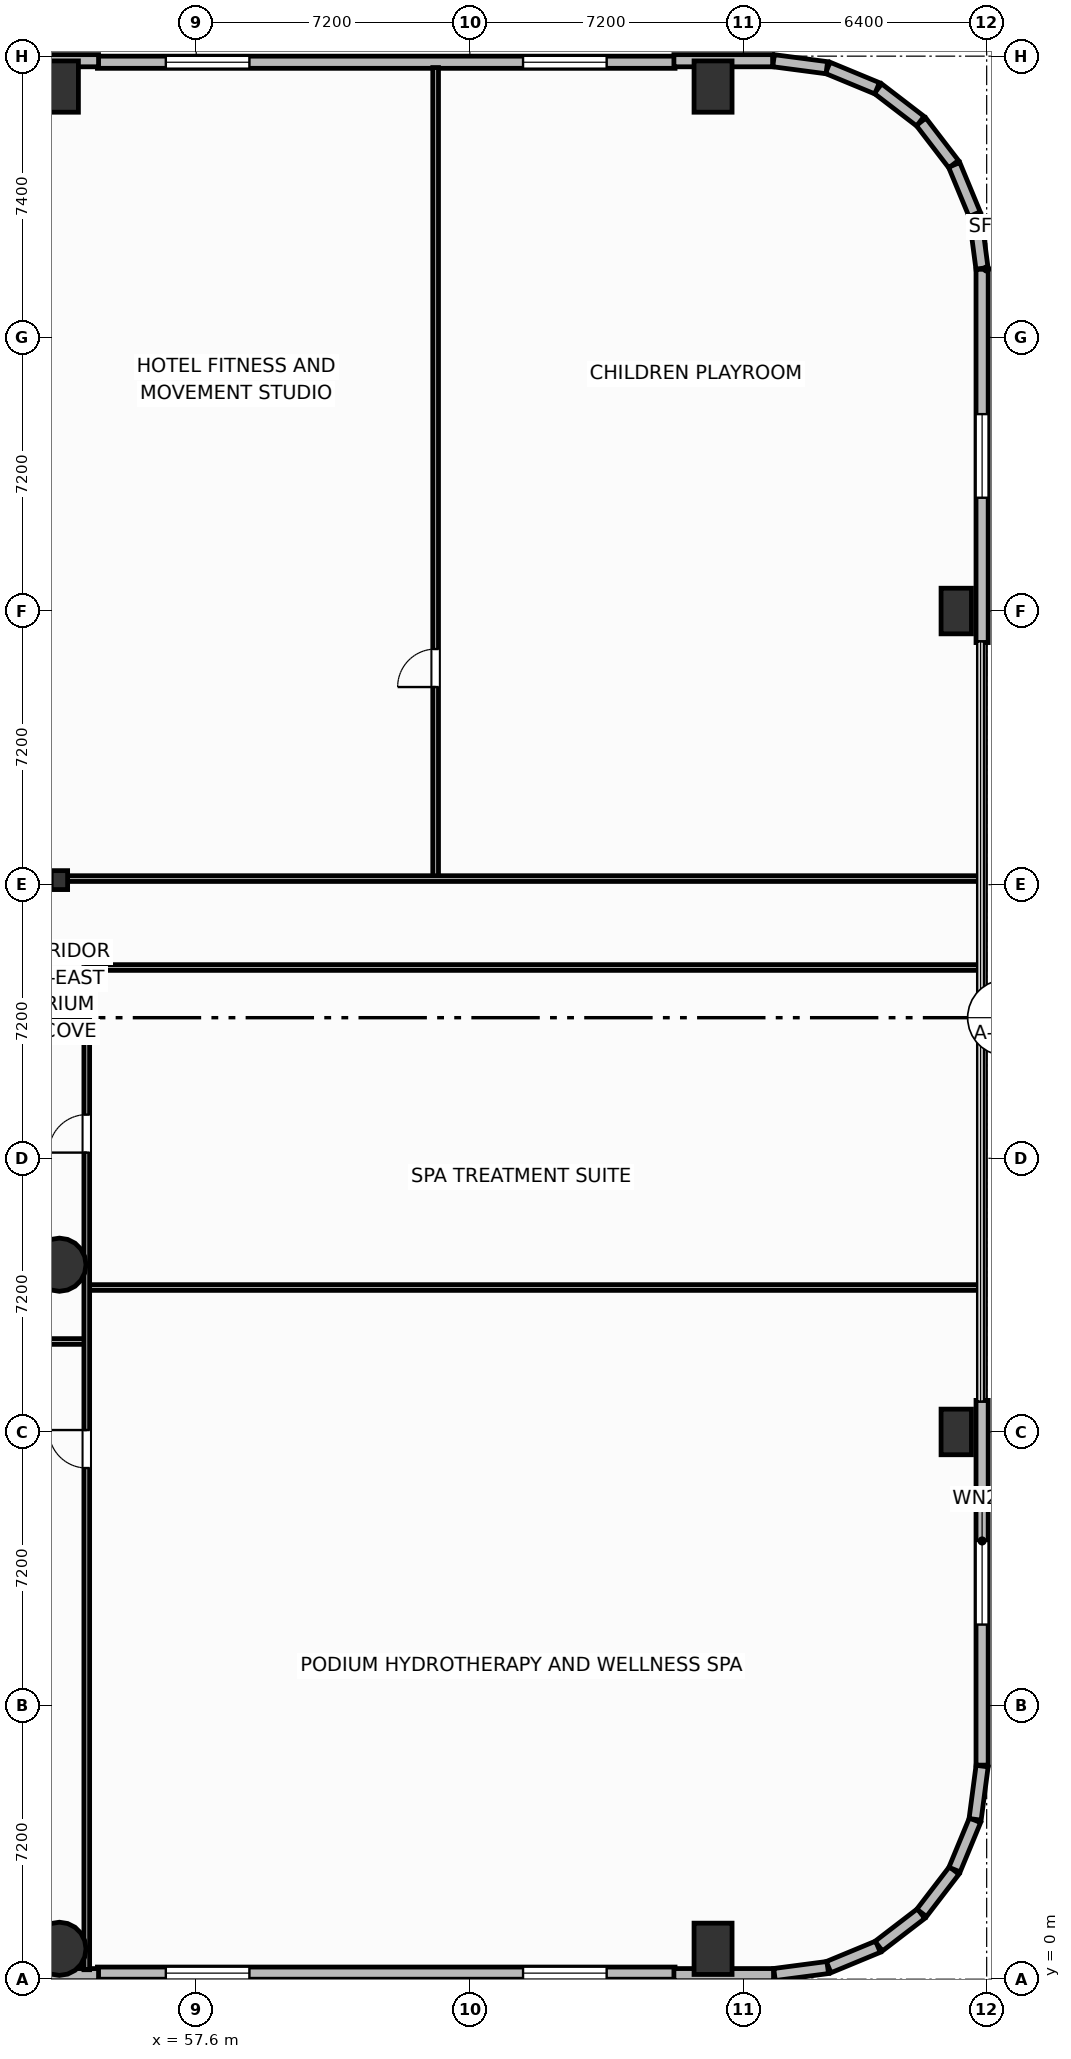
"""IFC4 building model, lengths in metres.
Left out: names, types, materials, properties, quantities, classifications, styles, units other than length and angle.
Written with IfcOpenShell. Run it as: python <this file> out.ifc"""

import sys

from ifc_helpers import new_model, si_unit, direction, frame, frame_2d, origin, origin_2d, place, context, subcontext, project, spatial, rectangle, circle, i_section, extrude, element, fill, save


model = new_model("IFC4")
c1 = context("Model", 3, precision=1e-05, world=origin(), true_north=direction((0.0, 1.0)))
c2 = subcontext(c1, "Body", "Model", "MODEL_VIEW")
j1 = project(units=[si_unit("LENGTHUNIT", "METRE"), si_unit("PLANEANGLEUNIT", "RADIAN")], contexts=[c1])
p1 = place(None, origin())
s1 = spatial("IfcSite", under=j1, at=p1, CompositionType="ELEMENT")
p2 = place(p1, origin())
s2 = spatial("IfcBuilding", under=s1, at=p2, CompositionType="ELEMENT")
p3 = place(p2, frame((0.0, 0.0, 21.6)))
s3 = spatial("IfcBuildingStorey", under=s2, at=p3, CompositionType="ELEMENT", Elevation=21.6)
p4 = place(p3, frame((54.0, 28.92, 0.0), z_axis=(0.0, 0.0, 1.0), x_axis=(1.0, 0.0, 0.0)))
e1 = element("IfcColumn", 1, at=p4, inside=s3, PredefinedType="COLUMN", context=c2, shape_type="SweptSolid", body=[
    extrude(i_section(OverallWidth=0.432, OverallDepth=0.498, WebThickness=0.056, FlangeThickness=0.089, FilletRadius=0.025, at=origin_2d()), origin(), (0.0, 0.0, 1.0), 5.4),
])
p5 = place(p3, frame((54.0, 0.8, 0.0), z_axis=(0.0, 0.0, 1.0), x_axis=(1.0, 0.0, 0.0)))
e2 = element("IfcColumn", 2, at=p5, inside=s3, PredefinedType="COLUMN", context=c2, shape_type="SweptSolid", body=[
    extrude(circle(Radius=0.7, at=origin_2d()), origin(), (0.0, 0.0, 1.0), 5.4),
])
p6 = place(p3, frame((71.2, 0.8, 0.0), z_axis=(0.0, 0.0, 1.0), x_axis=(1.0, 0.0, 0.0)))
e3 = element("IfcColumn", 3, at=p6, inside=s3, PredefinedType="COLUMN", context=c2, shape_type="SweptSolid", body=[
    extrude(rectangle(XDim=1.0, YDim=1.35, at=origin_2d()), origin(), (0.0, 0.0, 1.0), 5.4),
])
p7 = place(p3, frame((54.0, 18.8, 0.0), z_axis=(0.0, 0.0, 1.0), x_axis=(1.0, 0.0, 0.0)))
e4 = element("IfcColumn", 4, at=p7, inside=s3, PredefinedType="COLUMN", context=c2, shape_type="SweptSolid", body=[
    extrude(circle(Radius=0.7, at=origin_2d()), origin(), (0.0, 0.0, 1.0), 5.4),
])
for number, where, z_axis, x_axis in (
    (5, (54.0, 49.8, 0.0), (0.0, 0.0, 1.0), (1.0, 0.0, 0.0)),
    (6, (71.2, 49.8, 0.0), (0.0, 0.0, 1.0), (1.0, 0.0, 0.0)),
):
    element("IfcColumn", number, at=place(p3, frame(where, z_axis=z_axis, x_axis=x_axis)), inside=s3, PredefinedType="COLUMN", context=c2, shape_type="SweptSolid", body=[
        extrude(rectangle(XDim=1.0, YDim=1.35, at=origin_2d()), origin(), (0.0, 0.0, 1.0), 5.4),
    ])
for number, where, z_axis, x_axis in (
    (7, (77.6, 14.4, 0.0), (0.0, 0.0, 1.0), (1.0, 0.0, 0.0)),
    (8, (77.6, 36.0, 0.0), (0.0, 0.0, 1.0), (1.0, 0.0, 0.0)),
):
    element("IfcColumn", number, at=place(p3, frame(where, z_axis=z_axis, x_axis=x_axis)), inside=s3, PredefinedType="PILASTER", context=c2, shape_type="SweptSolid", body=[
        extrude(rectangle(XDim=0.8, YDim=1.2, at=origin_2d()), origin(), (0.0, 0.0, 1.0), 5.4),
    ])
p8 = place(p3, frame((55.0, 50.44, 0.0), z_axis=(0.0, 0.0, 1.0), x_axis=(1.0, 0.0, 0.0)))
e9 = element("IfcWall", 9, at=p8, inside=s3, PredefinedType="SOLIDWALL", context=c2, shape_type="SweptSolid", body=[
    extrude(rectangle(XDim=15.2, YDim=0.32, at=frame_2d((7.6, 0.0))), origin(), (0.0, 0.0, 1.0), 4.1),
])
p9 = place(p8, frame((1.8, 0.0, 0.8)))
e10 = element("IfcOpeningElement", 10, at=p9, cuts=e9, PredefinedType="OPENING", context=c2, shape_type="SweptSolid", body=[
    extrude(rectangle(XDim=2.2, YDim=1.11, at=frame_2d((1.1, 0.555))), frame((0.0, 0.17, 0.0), z_axis=(0.0, -1.0, 0.0), x_axis=(1.0, 0.0, 0.0)), (0.0, 0.0, 1.0), 0.34),
])
p10 = place(p8, frame((11.2, 0.0, 0.8)))
e11 = element("IfcOpeningElement", 11, at=p10, cuts=e9, PredefinedType="OPENING", context=c2, shape_type="SweptSolid", body=[
    extrude(rectangle(XDim=2.2, YDim=1.11, at=frame_2d((1.1, 0.555))), frame((0.0, 0.17, 0.0), z_axis=(0.0, -1.0, 0.0), x_axis=(1.0, 0.0, 0.0)), (0.0, 0.0, 1.0), 0.34),
])
p11 = place(p3, frame((70.2, 0.16, 0.0), z_axis=(0.0, 0.0, 1.0), x_axis=(-1.0, 0.0, 0.0)))
e12 = element("IfcWall", 12, at=p11, inside=s3, PredefinedType="SOLIDWALL", context=c2, shape_type="SweptSolid", body=[
    extrude(rectangle(XDim=15.2, YDim=0.32, at=frame_2d((7.6, 0.0))), origin(), (0.0, 0.0, 1.0), 4.1),
])
p12 = place(p11, frame((1.8, 0.0, 0.8)))
e13 = element("IfcOpeningElement", 13, at=p12, cuts=e12, PredefinedType="OPENING", context=c2, shape_type="SweptSolid", body=[
    extrude(rectangle(XDim=2.2, YDim=1.11, at=frame_2d((1.1, 0.555))), frame((0.0, 0.17, 0.0), z_axis=(0.0, -1.0, 0.0), x_axis=(1.0, 0.0, 0.0)), (0.0, 0.0, 1.0), 0.34),
])
p13 = place(p11, frame((11.2, 0.0, 0.8)))
e14 = element("IfcOpeningElement", 14, at=p13, cuts=e12, PredefinedType="OPENING", context=c2, shape_type="SweptSolid", body=[
    extrude(rectangle(XDim=2.2, YDim=1.11, at=frame_2d((1.1, 0.555))), frame((0.0, 0.17, 0.0), z_axis=(0.0, -1.0, 0.0), x_axis=(1.0, 0.0, 0.0)), (0.0, 0.0, 1.0), 0.34),
])
p14 = place(p3, frame((52.97, 0.12, 0.0), z_axis=(0.0, 0.0, 1.0), x_axis=(1.0, 0.0, 0.0)))
e15 = element("IfcWall", 15, at=p14, inside=s3, PredefinedType="SOLIDWALL", context=c2, shape_type="SweptSolid", body=[
    extrude(rectangle(XDim=2.06, YDim=0.32, at=frame_2d((1.03, 0.0))), origin(), (0.0, 0.0, 1.0), 4.1),
])
p15 = place(p3, frame((70.17, 0.12, 0.0), z_axis=(0.0, 0.0, 1.0), x_axis=(1.0, 0.0, 0.0)))
e16 = element("IfcWall", 16, at=p15, inside=s3, PredefinedType="SOLIDWALL", context=c2, shape_type="SweptSolid", body=[
    extrude(rectangle(XDim=2.622, YDim=0.32, at=frame_2d((1.311, 0.0))), origin(), (0.0, 0.0, 1.0), 4.1),
])
p16 = place(p3, frame((72.817, 0.123, 0.0), z_axis=(0.0, 0.0, 1.0), x_axis=(0.991457235349, 0.130432168094, 0.0)))
e17 = element("IfcWall", 17, at=p16, inside=s3, PredefinedType="SOLIDWALL", context=c2, shape_type="SweptSolid", body=[
    extrude(rectangle(XDim=1.413, YDim=0.32, at=frame_2d((0.707, 0.0))), origin(), (0.0, 0.0, 1.0), 4.1),
])
for number, where, z_axis, x_axis in (
    (18, (74.241, 0.317, 0.0), (0.0, 0.0, 1.0), (0.924, 0.383, 0.0)),
    (19, (75.559, 0.87, 0.0), (0.0, 0.0, 1.0), (0.793, 0.609, 0.0)),
    (20, (76.689, 1.746, 0.0), (0.0, 0.0, 1.0), (0.609, 0.793, 0.0)),
    (21, (77.554, 2.884, 0.0), (0.0, 0.0, 1.0), (0.383, 0.924, 0.0)),
):
    element("IfcWall", number, at=place(p3, frame(where, z_axis=z_axis, x_axis=x_axis)), inside=s3, PredefinedType="SOLIDWALL", context=c2, shape_type="SweptSolid", body=[
        extrude(rectangle(XDim=1.405, YDim=0.32, at=frame_2d((0.703, 0.0))), origin(), (0.0, 0.0, 1.0), 4.1),
    ])
p17 = place(p3, frame((78.096, 4.207, 0.0), z_axis=(0.0, 0.0, 1.0), x_axis=(0.130432168094, 0.991457235349, 0.0)))
e22 = element("IfcWall", 22, at=p17, inside=s3, PredefinedType="SOLIDWALL", context=c2, shape_type="SweptSolid", body=[
    extrude(rectangle(XDim=1.413, YDim=0.32, at=frame_2d((0.707, 0.0))), origin(), (0.0, 0.0, 1.0), 4.1),
])
p18 = place(p3, frame((78.28, 5.633, 0.0), z_axis=(0.0, 0.0, 1.0), x_axis=(0.0, 1.0, 0.0)))
e23 = element("IfcWall", 23, at=p18, inside=s3, PredefinedType="SOLIDWALL", context=c2, shape_type="SweptSolid", body=[
    extrude(rectangle(XDim=9.597, YDim=0.32, at=frame_2d((4.799, 0.0))), origin(), (0.0, 0.0, 1.0), 4.1),
])
p19 = place(p18, frame((3.698, 0.0, 0.8)))
e24 = element("IfcOpeningElement", 24, at=p19, cuts=e23, PredefinedType="OPENING", context=c2, shape_type="SweptSolid", body=[
    extrude(rectangle(XDim=2.2, YDim=2.0, at=frame_2d((1.1, 1.0))), frame((0.0, 0.17, 0.0), z_axis=(0.0, -1.0, 0.0), x_axis=(1.0, 0.0, 0.0)), (0.0, 0.0, 1.0), 0.34),
])
p20 = place(p3, frame((78.28, 35.17, 0.0), z_axis=(0.0, 0.0, 1.0), x_axis=(0.0, 1.0, 0.0)))
e25 = element("IfcWall", 25, at=p20, inside=s3, PredefinedType="SOLIDWALL", context=c2, shape_type="SweptSolid", body=[
    extrude(rectangle(XDim=9.822, YDim=0.32, at=frame_2d((4.911, 0.0))), origin(), (0.0, 0.0, 1.0), 4.1),
])
p21 = place(p20, frame((3.811, 0.0, 0.8)))
e26 = element("IfcOpeningElement", 26, at=p21, cuts=e25, PredefinedType="OPENING", context=c2, shape_type="SweptSolid", body=[
    extrude(rectangle(XDim=2.2, YDim=2.0, at=frame_2d((1.1, 1.0))), frame((0.0, 0.17, 0.0), z_axis=(0.0, -1.0, 0.0), x_axis=(1.0, 0.0, 0.0)), (0.0, 0.0, 1.0), 0.34),
])
p22 = place(p3, frame((78.277, 45.017, 0.0), z_axis=(0.0, 0.0, 1.0), x_axis=(-0.130409831203, 0.991460173646, 0.0)))
e27 = element("IfcWall", 27, at=p22, inside=s3, PredefinedType="SOLIDWALL", context=c2, shape_type="SweptSolid", body=[
    extrude(rectangle(XDim=1.413, YDim=0.32, at=frame_2d((0.707, 0.0))), origin(), (0.0, 0.0, 1.0), 4.1),
])
for number, where, z_axis, x_axis in (
    (28, (78.083, 46.441, 0.0), (0.0, 0.0, 1.0), (-0.383, 0.924, 0.0)),
    (29, (77.53, 47.759, 0.0), (0.0, 0.0, 1.0), (-0.609, 0.793, 0.0)),
    (30, (76.654, 48.889, 0.0), (0.0, 0.0, 1.0), (-0.793, 0.609, 0.0)),
    (31, (75.516, 49.754, 0.0), (0.0, 0.0, 1.0), (-0.924, 0.383, 0.0)),
):
    element("IfcWall", number, at=place(p3, frame(where, z_axis=z_axis, x_axis=x_axis)), inside=s3, PredefinedType="SOLIDWALL", context=c2, shape_type="SweptSolid", body=[
        extrude(rectangle(XDim=1.405, YDim=0.32, at=frame_2d((0.703, 0.0))), origin(), (0.0, 0.0, 1.0), 4.1),
    ])
p23 = place(p3, frame((74.193, 50.296, 0.0), z_axis=(0.0, 0.0, 1.0), x_axis=(-0.991460173646, 0.130409831203, 0.0)))
e32 = element("IfcWall", 32, at=p23, inside=s3, PredefinedType="SOLIDWALL", context=c2, shape_type="SweptSolid", body=[
    extrude(rectangle(XDim=1.413, YDim=0.32, at=frame_2d((0.707, 0.0))), origin(), (0.0, 0.0, 1.0), 4.1),
])
p24 = place(p3, frame((72.767, 50.48, 0.0), z_axis=(0.0, 0.0, 1.0), x_axis=(-1.0, 0.0, 0.0)))
e33 = element("IfcWall", 33, at=p24, inside=s3, PredefinedType="SOLIDWALL", context=c2, shape_type="SweptSolid", body=[
    extrude(rectangle(XDim=2.597, YDim=0.32, at=frame_2d((1.299, 0.0))), origin(), (0.0, 0.0, 1.0), 4.1),
])
p25 = place(p3, frame((55.03, 50.48, 0.0), z_axis=(0.0, 0.0, 1.0), x_axis=(-1.0, 0.0, 0.0)))
e34 = element("IfcWall", 34, at=p25, inside=s3, PredefinedType="SOLIDWALL", context=c2, shape_type="SweptSolid", body=[
    extrude(rectangle(XDim=2.06, YDim=0.32, at=frame_2d((1.03, 0.0))), origin(), (0.0, 0.0, 1.0), 4.1),
])
p26 = place(p3, frame((54.72, 18.2, 0.0), z_axis=(0.0, 0.0, 1.0), x_axis=(1.0, 0.0, 0.0)))
e35 = element("IfcWall", 35, at=p26, inside=s3, PredefinedType="PARTITIONING", context=c2, shape_type="SweptSolid", body=[
    extrude(rectangle(XDim=23.48, YDim=0.15, at=frame_2d((11.74, 0.0))), origin(), (0.0, 0.0, 1.0), 1.935),
])
p27 = place(p3, frame((63.9, 28.96, 0.0), z_axis=(0.0, 0.0, 1.0), x_axis=(0.0, 1.0, 0.0)))
e36 = element("IfcWall", 36, at=p27, inside=s3, PredefinedType="PARTITIONING", context=c2, shape_type="SweptSolid", body=[
    extrude(rectangle(XDim=21.34, YDim=0.15, at=frame_2d((10.67, 0.0))), origin(), (0.0, 0.0, 1.0), 5.15),
])
p28 = place(p27, frame((5.04, 0.0, 0.0)))
e37 = element("IfcOpeningElement", 37, at=p28, cuts=e36, PredefinedType="OPENING", context=c2, shape_type="SweptSolid", body=[
    extrude(rectangle(XDim=1.0, YDim=2.05, at=frame_2d((0.5, 1.025))), frame((0.0, 0.085, 0.0), z_axis=(0.0, -1.0, 0.0), x_axis=(1.0, 0.0, 0.0)), (0.0, 0.0, 1.0), 0.17),
])
p29 = place(p3, frame((23.68, 16.78, 0.0), z_axis=(0.0, 0.0, 1.0), x_axis=(1.0, 0.0, 0.0)))
e38 = element("IfcWall", 38, at=p29, inside=s3, PredefinedType="PARTITIONING", context=c2, shape_type="SweptSolid", body=[
    extrude(rectangle(XDim=31.04, YDim=0.15, at=frame_2d((15.52, 0.0))), origin(), (0.0, 0.0, 1.0), 5.15),
])
p30 = place(p29, frame((6.5, 0.0, 0.0)))
e39 = element("IfcOpeningElement", 39, at=p30, cuts=e38, PredefinedType="OPENING", context=c2, shape_type="SweptSolid", body=[
    extrude(rectangle(XDim=1.0, YDim=2.05, at=frame_2d((0.5, 1.025))), frame((0.0, 0.085, 0.0), z_axis=(0.0, -1.0, 0.0), x_axis=(1.0, 0.0, 0.0)), (0.0, 0.0, 1.0), 0.17),
])
p31 = place(p29, frame((21.0, 0.0, 0.0)))
e40 = element("IfcOpeningElement", 40, at=p31, cuts=e38, PredefinedType="OPENING", context=c2, shape_type="SweptSolid", body=[
    extrude(rectangle(XDim=1.0, YDim=2.05, at=frame_2d((0.5, 1.025))), frame((0.0, 0.085, 0.0), z_axis=(0.0, -1.0, 0.0), x_axis=(1.0, 0.0, 0.0)), (0.0, 0.0, 1.0), 0.17),
])
p32 = place(p3, frame((54.72, 0.25, 0.0), z_axis=(0.0, 0.0, 1.0), x_axis=(0.0, 1.0, 0.0)))
e41 = element("IfcWall", 41, at=p32, inside=s3, PredefinedType="PARTITIONING", context=c2, shape_type="SweptSolid", body=[
    extrude(rectangle(XDim=26.37, YDim=0.15, at=frame_2d((13.185, 0.0))), origin(), (0.0, 0.0, 1.0), 5.15),
])
p33 = place(p32, frame((21.5, 0.0, 0.0)))
e42 = element("IfcOpeningElement", 42, at=p33, cuts=e41, PredefinedType="OPENING", context=c2, shape_type="SweptSolid", body=[
    extrude(rectangle(XDim=1.0, YDim=2.05, at=frame_2d((0.5, 1.025))), frame((0.0, 0.085, 0.0), z_axis=(0.0, -1.0, 0.0), x_axis=(1.0, 0.0, 0.0)), (0.0, 0.0, 1.0), 0.17),
])
p34 = place(p32, frame((13.2, 0.0, 0.0)))
e43 = element("IfcOpeningElement", 43, at=p34, cuts=e41, PredefinedType="OPENING", context=c2, shape_type="SweptSolid", body=[
    extrude(rectangle(XDim=1.0, YDim=2.05, at=frame_2d((0.5, 1.025))), frame((0.0, 0.085, 0.0), z_axis=(0.0, -1.0, 0.0), x_axis=(1.0, 0.0, 0.0)), (0.0, 0.0, 1.0), 0.17),
])
p35 = place(p3, frame((54.72, 26.62, 0.0), z_axis=(0.0, 0.0, 1.0), x_axis=(1.0, 0.0, 0.0)))
e44 = element("IfcWall", 44, at=p35, inside=s3, PredefinedType="PARTITIONING", context=c2, shape_type="SweptSolid", body=[
    extrude(rectangle(XDim=23.48, YDim=0.15, at=frame_2d((11.74, 0.0))), origin(), (0.0, 0.0, 1.0), 5.15),
])
p36 = place(p3, frame((53.44, 28.96, 0.0), z_axis=(0.0, 0.0, 1.0), x_axis=(1.0, 0.0, 0.0)))
e45 = element("IfcWall", 45, at=p36, inside=s3, PredefinedType="PARTITIONING", context=c2, shape_type="SweptSolid", body=[
    extrude(rectangle(XDim=24.76, YDim=0.15, at=frame_2d((12.38, 0.0))), origin(), (0.0, 0.0, 1.0), 1.935),
])
p37 = place(p9, origin())
e46 = element("IfcWindow", 46, at=p37, inside=s3, PartitioningType="SINGLE_PANEL", PredefinedType="WINDOW", context=c2, shape_type="SweptSolid", body=[
    extrude(rectangle(XDim=2.2, YDim=1.11, at=frame_2d((1.1, 0.555))), frame((0.0, 0.03, 0.0), z_axis=(0.0, -1.0, 0.0), x_axis=(1.0, 0.0, 0.0)), (0.0, 0.0, 1.0), 0.06),
])
fill(e10, e46)
p38 = place(p10, origin())
e47 = element("IfcWindow", 47, at=p38, inside=s3, PartitioningType="SINGLE_PANEL", PredefinedType="WINDOW", context=c2, shape_type="SweptSolid", body=[
    extrude(rectangle(XDim=2.2, YDim=1.11, at=frame_2d((1.1, 0.555))), frame((0.0, 0.03, 0.0), z_axis=(0.0, -1.0, 0.0), x_axis=(1.0, 0.0, 0.0)), (0.0, 0.0, 1.0), 0.06),
])
fill(e11, e47)
p39 = place(p12, origin())
e48 = element("IfcWindow", 48, at=p39, inside=s3, PartitioningType="SINGLE_PANEL", PredefinedType="WINDOW", context=c2, shape_type="SweptSolid", body=[
    extrude(rectangle(XDim=2.2, YDim=1.11, at=frame_2d((1.1, 0.555))), frame((0.0, 0.03, 0.0), z_axis=(0.0, -1.0, 0.0), x_axis=(1.0, 0.0, 0.0)), (0.0, 0.0, 1.0), 0.06),
])
fill(e13, e48)
p40 = place(p13, origin())
e49 = element("IfcWindow", 49, at=p40, inside=s3, PartitioningType="SINGLE_PANEL", PredefinedType="WINDOW", context=c2, shape_type="SweptSolid", body=[
    extrude(rectangle(XDim=2.2, YDim=1.11, at=frame_2d((1.1, 0.555))), frame((0.0, 0.03, 0.0), z_axis=(0.0, -1.0, 0.0), x_axis=(1.0, 0.0, 0.0)), (0.0, 0.0, 1.0), 0.06),
])
fill(e14, e49)
p41 = place(p19, origin())
e50 = element("IfcWindow", 50, at=p41, inside=s3, PartitioningType="SINGLE_PANEL", PredefinedType="WINDOW", context=c2, shape_type="SweptSolid", body=[
    extrude(rectangle(XDim=2.2, YDim=2.0, at=frame_2d((1.1, 1.0))), frame((0.0, 0.03, 0.0), z_axis=(0.0, -1.0, 0.0), x_axis=(1.0, 0.0, 0.0)), (0.0, 0.0, 1.0), 0.06),
])
fill(e24, e50)
p42 = place(p21, origin())
e51 = element("IfcWindow", 51, at=p42, inside=s3, PartitioningType="SINGLE_PANEL", PredefinedType="WINDOW", context=c2, shape_type="SweptSolid", body=[
    extrude(rectangle(XDim=2.2, YDim=2.0, at=frame_2d((1.1, 1.0))), frame((0.0, 0.03, 0.0), z_axis=(0.0, -1.0, 0.0), x_axis=(1.0, 0.0, 0.0)), (0.0, 0.0, 1.0), 0.06),
])
fill(e26, e51)
p43 = place(p28, origin())
e52 = element("IfcDoor", 52, at=p43, inside=s3, OperationType="SINGLE_SWING_LEFT", PredefinedType="DOOR", context=c2, shape_type="SweptSolid", body=[
    extrude(rectangle(XDim=1.0, YDim=2.05, at=frame_2d((0.5, 1.025))), frame((0.0, 0.025, 0.0), z_axis=(0.0, -1.0, 0.0), x_axis=(1.0, 0.0, 0.0)), (0.0, 0.0, 1.0), 0.05),
])
fill(e37, e52)
p44 = place(p33, origin())
e53 = element("IfcDoor", 53, at=p44, inside=s3, OperationType="SINGLE_SWING_LEFT", PredefinedType="DOOR", context=c2, shape_type="SweptSolid", body=[
    extrude(rectangle(XDim=1.0, YDim=2.05, at=frame_2d((0.5, 1.025))), frame((0.0, 0.025, 0.0), z_axis=(0.0, -1.0, 0.0), x_axis=(1.0, 0.0, 0.0)), (0.0, 0.0, 1.0), 0.05),
])
fill(e42, e53)
p45 = place(p34, origin())
e54 = element("IfcDoor", 54, at=p45, inside=s3, OperationType="SINGLE_SWING_RIGHT", PredefinedType="DOOR", context=c2, shape_type="SweptSolid", body=[
    extrude(rectangle(XDim=1.0, YDim=2.05, at=frame_2d((0.5, 1.025))), frame((0.0, 0.025, 0.0), z_axis=(0.0, -1.0, 0.0), x_axis=(1.0, 0.0, 0.0)), (0.0, 0.0, 1.0), 0.05),
])
fill(e43, e54)
save(model, sys.argv[1])
